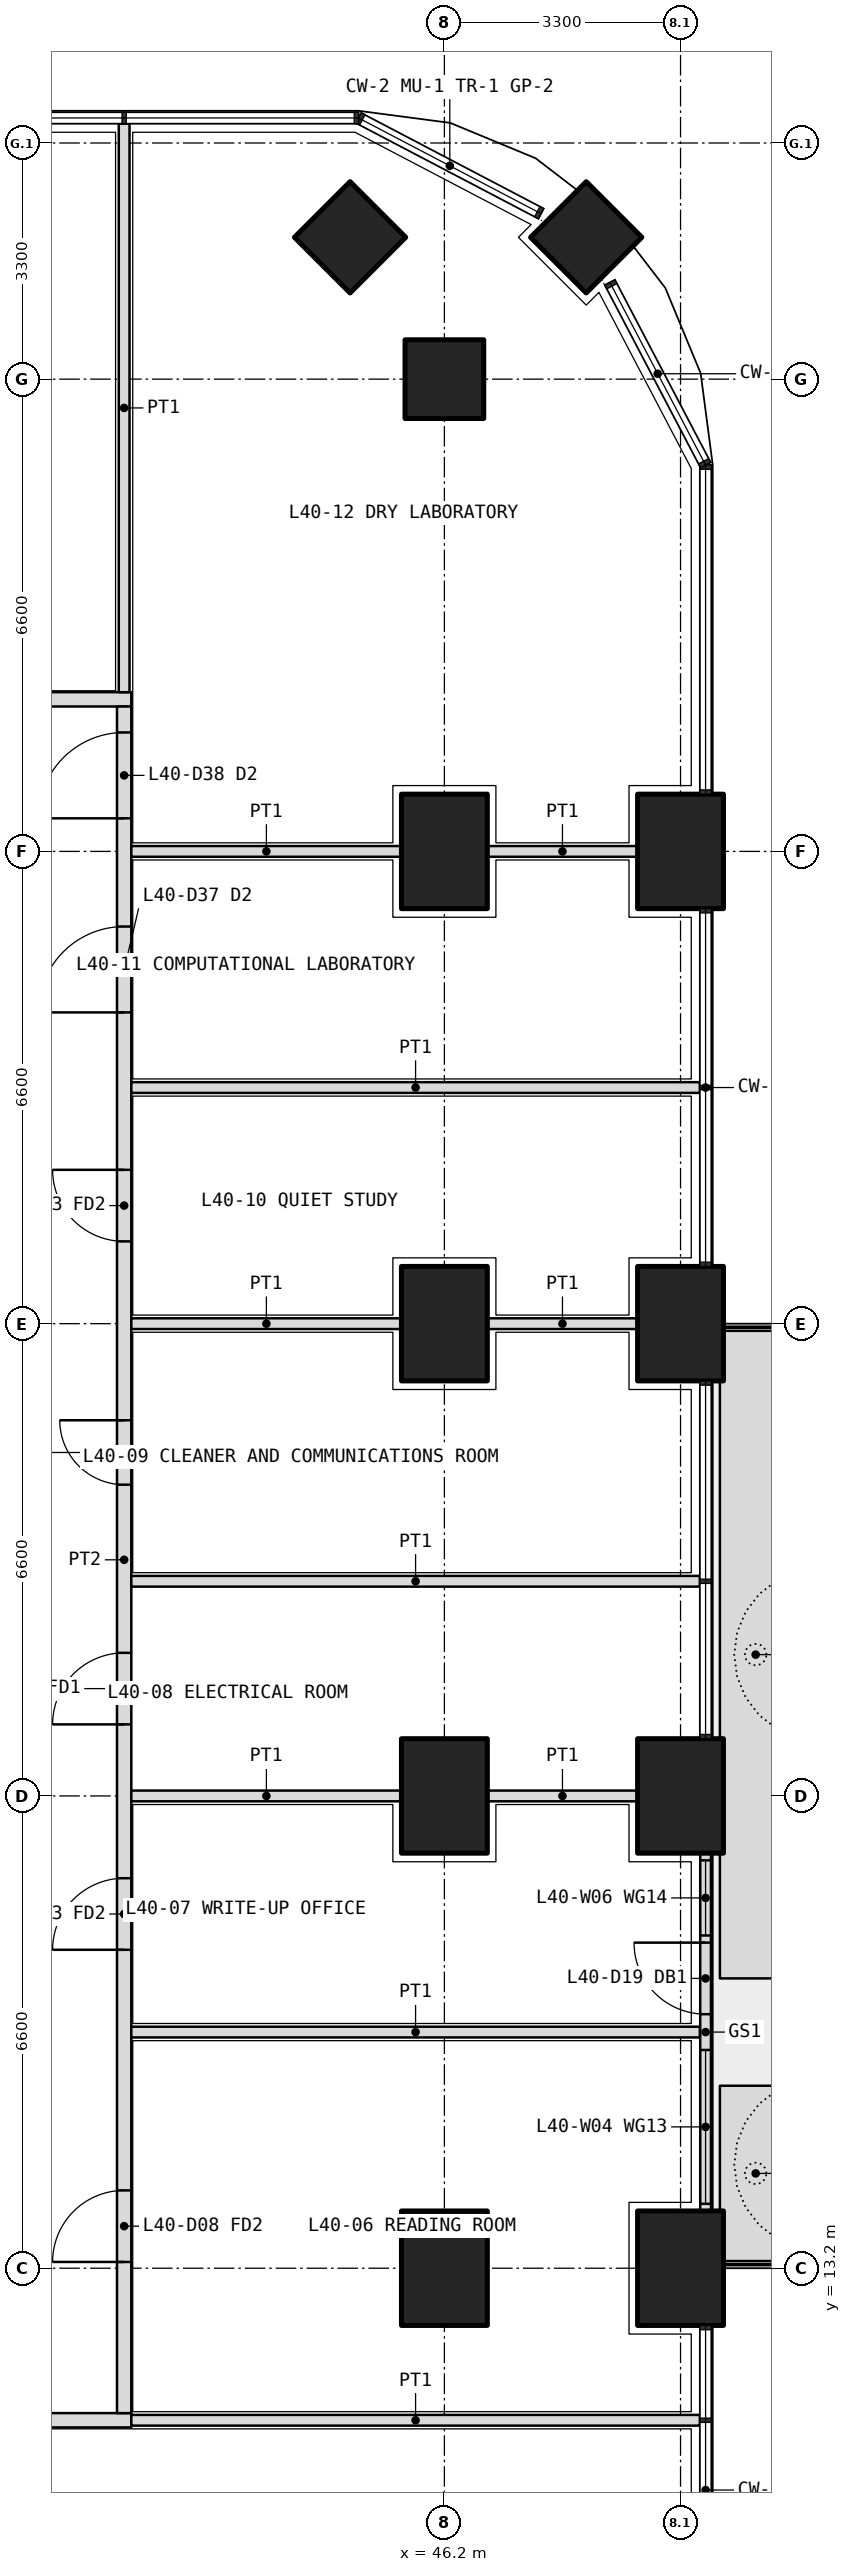
"""IFC4 building model, lengths in metres.
Left out: names, types, materials, properties, quantities, classifications, styles, units other than length and angle.
Written with IfcOpenShell. Run it as: python <this file> out.ifc"""

import sys

from ifc_helpers import new_model, si_unit, direction, frame, frame_2d, origin, origin_2d, place, context, subcontext, project, spatial, polyline, rectangle, outline, extrude, element, fill, save


model = new_model("IFC4")
c1 = context("Model", 3, precision=1e-05, world=origin(), true_north=direction((0.0, 1.0)))
c2 = subcontext(c1, "Body", "Model", "MODEL_VIEW")
j1 = project(units=[si_unit("LENGTHUNIT", "METRE"), si_unit("PLANEANGLEUNIT", "RADIAN")], contexts=[c1])
p1 = place(None, origin())
s1 = spatial("IfcSite", under=j1, at=p1, CompositionType="ELEMENT")
p2 = place(p1, origin())
s2 = spatial("IfcBuilding", under=s1, at=p2, CompositionType="ELEMENT")
p3 = place(p2, frame((0.0, 0.0, 176.7)))
s3 = spatial("IfcBuildingStorey", under=s2, at=p3, CompositionType="ELEMENT", Elevation=176.7)
p4 = place(p3, frame((48.182, 41.582, 0.0), z_axis=(0.0, 0.0, 1.0), x_axis=(0.707106781187, 0.707106781187, 0.0)))
e1 = element("IfcColumn", 1, at=p4, inside=s3, PredefinedType="COLUMN", context=c2, shape_type="SweptSolid", body=[
    extrude(rectangle(XDim=1.1, YDim=1.1, at=origin_2d()), origin(), (0.0, 0.0, 1.0), 4.2),
])
for number, where, z_axis, x_axis in (
    (2, (49.5, 13.2, 0.0), (0.0, 0.0, 1.0), (0.0, 1.0, 0.0)),
    (3, (49.5, 19.8, 0.0), (0.0, 0.0, 1.0), (0.0, 1.0, 0.0)),
    (4, (49.5, 26.4, 0.0), (0.0, 0.0, 1.0), (0.0, 1.0, 0.0)),
    (5, (49.5, 33.0, 0.0), (0.0, 0.0, 1.0), (0.0, 1.0, 0.0)),
):
    element("IfcColumn", number, at=place(p3, frame(where, z_axis=z_axis, x_axis=x_axis)), inside=s3, PredefinedType="COLUMN", context=c2, shape_type="SweptSolid", body=[
        extrude(rectangle(XDim=1.6, YDim=1.2, at=origin_2d()), origin(), (0.0, 0.0, 1.0), 4.2),
    ])
for number, where, z_axis, x_axis in (
    (6, (46.2, 39.6, 0.0), (0.0, 0.0, 1.0), (1.0, 0.0, 0.0)),
    (7, (44.882, 41.582, 0.0), (0.0, 0.0, 1.0), (0.707, 0.707, 0.0)),
):
    element("IfcColumn", number, at=place(p3, frame(where, z_axis=z_axis, x_axis=x_axis)), inside=s3, PredefinedType="COLUMN", context=c2, shape_type="SweptSolid", body=[
        extrude(rectangle(XDim=1.1, YDim=1.1, at=origin_2d()), origin(), (0.0, 0.0, 1.0), 4.2),
    ])
for number, where, z_axis, x_axis in (
    (8, (46.2, 13.2, 0.0), (0.0, 0.0, 1.0), (0.0, 1.0, 0.0)),
    (9, (46.2, 19.8, 0.0), (0.0, 0.0, 1.0), (0.0, 1.0, 0.0)),
    (10, (46.2, 26.4, 0.0), (0.0, 0.0, 1.0), (0.0, 1.0, 0.0)),
    (11, (46.2, 33.0, 0.0), (0.0, 0.0, 1.0), (0.0, 1.0, 0.0)),
):
    element("IfcColumn", number, at=place(p3, frame(where, z_axis=z_axis, x_axis=x_axis)), inside=s3, PredefinedType="COLUMN", context=c2, shape_type="SweptSolid", body=[
        extrude(rectangle(XDim=1.6, YDim=1.2, at=origin_2d()), origin(), (0.0, 0.0, 1.0), 4.2),
    ])
p5 = place(p3, origin())
e12 = element("IfcWall", 12, at=p5, inside=s3, PredefinedType="USERDEFINED", context=c2, shape_type="SweptSolid", body=[
    extrude(outline(polyline([(50.05, 13.3), (51.05, 13.3), (51.05, 15.75), (50.05, 15.75), (50.05, 13.3)]), holes=[polyline([(50.2, 13.45), (50.9, 13.45), (50.9, 15.6), (50.2, 15.6), (50.2, 13.45)])]), origin(), (0.0, 0.0, 1.0), 1.05),
])
p6 = place(p3, origin())
e13 = element("IfcWall", 13, at=p6, inside=s3, PredefinedType="USERDEFINED", context=c2, shape_type="SweptSolid", body=[
    extrude(outline(polyline([(50.05, 17.25), (51.05, 17.25), (51.05, 26.3), (50.05, 26.3), (50.05, 17.25)]), holes=[polyline([(50.2, 17.4), (50.9, 17.4), (50.9, 26.15), (50.2, 26.15), (50.2, 17.4)])]), origin(), (0.0, 0.0, 1.0), 1.05),
])
p7 = place(p3, frame((49.85, 14.0, 0.0), z_axis=(0.0, 0.0, 1.0), x_axis=(0.0, 1.0, 0.0)))
e14 = element("IfcWall", 14, at=p7, inside=s3, PredefinedType="SOLIDWALL", context=c2, shape_type="SweptSolid", body=[
    extrude(rectangle(XDim=5.0, YDim=0.15, at=frame_2d((2.5, 0.0))), origin(), (0.0, 0.0, 1.0), 2.7),
])
p8 = place(p7, frame((2.75, 0.0, 0.0)))
e15 = element("IfcOpeningElement", 15, at=p8, cuts=e14, PredefinedType="OPENING", context=c2, shape_type="SweptSolid", body=[
    extrude(rectangle(XDim=1.0, YDim=2.4, at=frame_2d((0.5, 1.2))), frame((0.0, 0.085, 0.0), z_axis=(0.0, -1.0, 0.0), x_axis=(1.0, 0.0, 0.0)), (0.0, 0.0, 1.0), 0.17),
])
p9 = place(p7, frame((0.1, 0.0, 0.1)))
e16 = element("IfcOpeningElement", 16, at=p9, cuts=e14, PredefinedType="OPENING", context=c2, shape_type="SweptSolid", body=[
    extrude(rectangle(XDim=2.15, YDim=2.3, at=frame_2d((1.075, 1.15))), frame((0.0, 0.085, 0.0), z_axis=(0.0, -1.0, 0.0), x_axis=(1.0, 0.0, 0.0)), (0.0, 0.0, 1.0), 0.17),
])
p10 = place(p7, frame((3.85, 0.0, 0.1)))
e17 = element("IfcOpeningElement", 17, at=p10, cuts=e14, PredefinedType="OPENING", context=c2, shape_type="SweptSolid", body=[
    extrude(rectangle(XDim=1.05, YDim=2.3, at=frame_2d((0.525, 1.15))), frame((0.0, 0.085, 0.0), z_axis=(0.0, -1.0, 0.0), x_axis=(1.0, 0.0, 0.0)), (0.0, 0.0, 1.0), 0.17),
])
p11 = place(p3, frame((36.3, 11.075, 0.0), z_axis=(0.0, 0.0, 1.0), x_axis=(1.0, 0.0, 0.0)))
e18 = element("IfcWall", 18, at=p11, inside=s3, PredefinedType="PARTITIONING", context=c2, shape_type="SweptSolid", body=[
    extrude(rectangle(XDim=5.525, YDim=0.2, at=frame_2d((2.762, 0.0))), origin(), (0.0, 0.0, 1.0), 2.85),
])
p12 = place(p11, frame((2.113, 0.0, 0.0)))
e19 = element("IfcOpeningElement", 19, at=p12, cuts=e18, PredefinedType="OPENING", context=c2, shape_type="SweptSolid", body=[
    extrude(rectangle(XDim=1.2, YDim=2.1, at=frame_2d((0.6, 1.05))), frame((0.0, 0.11, 0.0), z_axis=(0.0, -1.0, 0.0), x_axis=(1.0, 0.0, 0.0)), (0.0, 0.0, 1.0), 0.22),
])
p13 = place(p3, frame((10.975, 35.125, 0.0), z_axis=(0.0, 0.0, 1.0), x_axis=(1.0, 0.0, 0.0)))
e20 = element("IfcWall", 20, at=p13, inside=s3, PredefinedType="PARTITIONING", context=c2, shape_type="SweptSolid", body=[
    extrude(rectangle(XDim=30.85, YDim=0.2, at=frame_2d((15.425, 0.0))), origin(), (0.0, 0.0, 1.0), 2.85),
])
p14 = place(p13, frame((2.312, 0.0, 0.0)))
e21 = element("IfcOpeningElement", 21, at=p14, cuts=e20, PredefinedType="OPENING", context=c2, shape_type="SweptSolid", body=[
    extrude(rectangle(XDim=1.0, YDim=2.1, at=frame_2d((0.5, 1.05))), frame((0.0, 0.11, 0.0), z_axis=(0.0, -1.0, 0.0), x_axis=(1.0, 0.0, 0.0)), (0.0, 0.0, 1.0), 0.22),
])
p15 = place(p13, frame((7.125, 0.0, 0.0)))
e22 = element("IfcOpeningElement", 22, at=p15, cuts=e20, PredefinedType="OPENING", context=c2, shape_type="SweptSolid", body=[
    extrude(rectangle(XDim=1.0, YDim=2.1, at=frame_2d((0.5, 1.05))), frame((0.0, 0.11, 0.0), z_axis=(0.0, -1.0, 0.0), x_axis=(1.0, 0.0, 0.0)), (0.0, 0.0, 1.0), 0.22),
])
p16 = place(p13, frame((10.425, 0.0, 0.0)))
e23 = element("IfcOpeningElement", 23, at=p16, cuts=e20, PredefinedType="OPENING", context=c2, shape_type="SweptSolid", body=[
    extrude(rectangle(XDim=1.0, YDim=2.1, at=frame_2d((0.5, 1.05))), frame((0.0, 0.11, 0.0), z_axis=(0.0, -1.0, 0.0), x_axis=(1.0, 0.0, 0.0)), (0.0, 0.0, 1.0), 0.22),
])
p17 = place(p13, frame((16.575, 0.0, 0.0)))
e24 = element("IfcOpeningElement", 24, at=p17, cuts=e20, PredefinedType="OPENING", context=c2, shape_type="SweptSolid", body=[
    extrude(rectangle(XDim=1.0, YDim=2.1, at=frame_2d((0.5, 1.05))), frame((0.0, 0.11, 0.0), z_axis=(0.0, -1.0, 0.0), x_axis=(1.0, 0.0, 0.0)), (0.0, 0.0, 1.0), 0.22),
])
p18 = place(p13, frame((25.887, 0.0, 0.0)))
e25 = element("IfcOpeningElement", 25, at=p18, cuts=e20, PredefinedType="OPENING", context=c2, shape_type="SweptSolid", body=[
    extrude(rectangle(XDim=1.0, YDim=2.1, at=frame_2d((0.5, 1.05))), frame((0.0, 0.11, 0.0), z_axis=(0.0, -1.0, 0.0), x_axis=(1.0, 0.0, 0.0)), (0.0, 0.0, 1.0), 0.22),
])
p19 = place(p3, frame((41.725, 11.175, 0.0), z_axis=(0.0, 0.0, 1.0), x_axis=(0.0, 1.0, 0.0)))
e26 = element("IfcWall", 26, at=p19, inside=s3, PredefinedType="PARTITIONING", context=c2, shape_type="SweptSolid", body=[
    extrude(rectangle(XDim=23.85, YDim=0.2, at=frame_2d((11.925, 0.0))), origin(), (0.0, 0.0, 1.0), 2.85),
])
p20 = place(p19, frame((2.113, 0.0, 0.0)))
e27 = element("IfcOpeningElement", 27, at=p20, cuts=e26, PredefinedType="OPENING", context=c2, shape_type="SweptSolid", body=[
    extrude(rectangle(XDim=1.0, YDim=2.1, at=frame_2d((0.5, 1.05))), frame((0.0, 0.11, 0.0), z_axis=(0.0, -1.0, 0.0), x_axis=(1.0, 0.0, 0.0)), (0.0, 0.0, 1.0), 0.22),
])
p21 = place(p19, frame((6.475, 0.0, 0.0)))
e28 = element("IfcOpeningElement", 28, at=p21, cuts=e26, PredefinedType="OPENING", context=c2, shape_type="SweptSolid", body=[
    extrude(rectangle(XDim=1.0, YDim=2.1, at=frame_2d((0.5, 1.05))), frame((0.0, 0.11, 0.0), z_axis=(0.0, -1.0, 0.0), x_axis=(1.0, 0.0, 0.0)), (0.0, 0.0, 1.0), 0.22),
])
p22 = place(p19, frame((9.625, 0.0, 0.0)))
e29 = element("IfcOpeningElement", 29, at=p22, cuts=e26, PredefinedType="OPENING", context=c2, shape_type="SweptSolid", body=[
    extrude(rectangle(XDim=1.0, YDim=2.1, at=frame_2d((0.5, 1.05))), frame((0.0, 0.11, 0.0), z_axis=(0.0, -1.0, 0.0), x_axis=(1.0, 0.0, 0.0)), (0.0, 0.0, 1.0), 0.22),
])
p23 = place(p19, frame((12.975, 0.0, 0.0)))
e30 = element("IfcOpeningElement", 30, at=p23, cuts=e26, PredefinedType="OPENING", context=c2, shape_type="SweptSolid", body=[
    extrude(rectangle(XDim=0.9, YDim=2.1, at=frame_2d((0.45, 1.05))), frame((0.0, 0.11, 0.0), z_axis=(0.0, -1.0, 0.0), x_axis=(1.0, 0.0, 0.0)), (0.0, 0.0, 1.0), 0.22),
])
p24 = place(p19, frame((16.375, 0.0, 0.0)))
e31 = element("IfcOpeningElement", 31, at=p24, cuts=e26, PredefinedType="OPENING", context=c2, shape_type="SweptSolid", body=[
    extrude(rectangle(XDim=1.0, YDim=2.1, at=frame_2d((0.5, 1.05))), frame((0.0, 0.11, 0.0), z_axis=(0.0, -1.0, 0.0), x_axis=(1.0, 0.0, 0.0)), (0.0, 0.0, 1.0), 0.22),
])
p25 = place(p19, frame((19.575, 0.0, 0.0)))
e32 = element("IfcOpeningElement", 32, at=p25, cuts=e26, PredefinedType="OPENING", context=c2, shape_type="SweptSolid", body=[
    extrude(rectangle(XDim=1.2, YDim=2.1, at=frame_2d((0.6, 1.05))), frame((0.0, 0.11, 0.0), z_axis=(0.0, -1.0, 0.0), x_axis=(1.0, 0.0, 0.0)), (0.0, 0.0, 1.0), 0.22),
])
p26 = place(p19, frame((22.288, 0.0, 0.0)))
e33 = element("IfcOpeningElement", 33, at=p26, cuts=e26, PredefinedType="OPENING", context=c2, shape_type="SweptSolid", body=[
    extrude(rectangle(XDim=1.2, YDim=2.1, at=frame_2d((0.6, 1.05))), frame((0.0, 0.11, 0.0), z_axis=(0.0, -1.0, 0.0), x_axis=(1.0, 0.0, 0.0)), (0.0, 0.0, 1.0), 0.22),
])
p27 = place(p3, frame((49.77, 11.075, 0.0), z_axis=(0.0, 0.0, 1.0), x_axis=(-1.0, 0.0, 0.0)))
e34 = element("IfcWall", 34, at=p27, inside=s3, PredefinedType="PARTITIONING", context=c2, shape_type="SweptSolid", body=[
    extrude(rectangle(XDim=7.945, YDim=0.15, at=frame_2d((3.973, 0.0))), origin(), (0.0, 0.0, 1.0), 2.7),
])
p28 = place(p3, frame((41.725, 43.17, 0.0), z_axis=(0.0, 0.0, 1.0), x_axis=(0.0, -1.0, 0.0)))
e35 = element("IfcWall", 35, at=p28, inside=s3, PredefinedType="PARTITIONING", context=c2, shape_type="SweptSolid", body=[
    extrude(rectangle(XDim=7.945, YDim=0.15, at=frame_2d((3.972, 0.0))), origin(), (0.0, 0.0, 1.0), 2.7),
])
p29 = place(p3, frame((49.77, 22.8, 0.0), z_axis=(0.0, 0.0, 1.0), x_axis=(-1.0, 0.0, 0.0)))
e36 = element("IfcWall", 36, at=p29, inside=s3, PredefinedType="PARTITIONING", context=c2, shape_type="SweptSolid", body=[
    extrude(rectangle(XDim=7.945, YDim=0.15, at=frame_2d((3.973, 0.0))), origin(), (0.0, 0.0, 1.0), 2.7),
])
p30 = place(p3, frame((48.9, 26.4, 0.0), z_axis=(0.0, 0.0, 1.0), x_axis=(-1.0, 0.0, 0.0)))
e37 = element("IfcWall", 37, at=p30, inside=s3, PredefinedType="PARTITIONING", context=c2, shape_type="SweptSolid", body=[
    extrude(rectangle(XDim=2.1, YDim=0.15, at=frame_2d((1.05, 0.0))), origin(), (0.0, 0.0, 1.0), 2.85),
])
p31 = place(p3, frame((45.6, 26.4, 0.0), z_axis=(0.0, 0.0, 1.0), x_axis=(-1.0, 0.0, 0.0)))
e38 = element("IfcWall", 38, at=p31, inside=s3, PredefinedType="PARTITIONING", context=c2, shape_type="SweptSolid", body=[
    extrude(rectangle(XDim=3.775, YDim=0.15, at=frame_2d((1.888, 0.0))), origin(), (0.0, 0.0, 1.0), 2.85),
])
p32 = place(p3, frame((49.77, 16.5, 0.0), z_axis=(0.0, 0.0, 1.0), x_axis=(-1.0, 0.0, 0.0)))
e39 = element("IfcWall", 39, at=p32, inside=s3, PredefinedType="PARTITIONING", context=c2, shape_type="SweptSolid", body=[
    extrude(rectangle(XDim=7.945, YDim=0.15, at=frame_2d((3.973, 0.0))), origin(), (0.0, 0.0, 1.0), 2.7),
])
p33 = place(p3, frame((48.9, 19.8, 0.0), z_axis=(0.0, 0.0, 1.0), x_axis=(-1.0, 0.0, 0.0)))
e40 = element("IfcWall", 40, at=p33, inside=s3, PredefinedType="PARTITIONING", context=c2, shape_type="SweptSolid", body=[
    extrude(rectangle(XDim=2.1, YDim=0.15, at=frame_2d((1.05, 0.0))), origin(), (0.0, 0.0, 1.0), 2.85),
])
p34 = place(p3, frame((45.6, 19.8, 0.0), z_axis=(0.0, 0.0, 1.0), x_axis=(-1.0, 0.0, 0.0)))
e41 = element("IfcWall", 41, at=p34, inside=s3, PredefinedType="PARTITIONING", context=c2, shape_type="SweptSolid", body=[
    extrude(rectangle(XDim=3.775, YDim=0.15, at=frame_2d((1.888, 0.0))), origin(), (0.0, 0.0, 1.0), 2.85),
])
p35 = place(p3, frame((49.77, 29.7, 0.0), z_axis=(0.0, 0.0, 1.0), x_axis=(-1.0, 0.0, 0.0)))
e42 = element("IfcWall", 42, at=p35, inside=s3, PredefinedType="PARTITIONING", context=c2, shape_type="SweptSolid", body=[
    extrude(rectangle(XDim=7.945, YDim=0.15, at=frame_2d((3.973, 0.0))), origin(), (0.0, 0.0, 1.0), 2.7),
])
p36 = place(p3, frame((48.9, 33.0, 0.0), z_axis=(0.0, 0.0, 1.0), x_axis=(-1.0, 0.0, 0.0)))
e43 = element("IfcWall", 43, at=p36, inside=s3, PredefinedType="PARTITIONING", context=c2, shape_type="SweptSolid", body=[
    extrude(rectangle(XDim=2.1, YDim=0.15, at=frame_2d((1.05, 0.0))), origin(), (0.0, 0.0, 1.0), 2.85),
])
p37 = place(p3, frame((45.6, 33.0, 0.0), z_axis=(0.0, 0.0, 1.0), x_axis=(-1.0, 0.0, 0.0)))
e44 = element("IfcWall", 44, at=p37, inside=s3, PredefinedType="PARTITIONING", context=c2, shape_type="SweptSolid", body=[
    extrude(rectangle(XDim=3.775, YDim=0.15, at=frame_2d((1.888, 0.0))), origin(), (0.0, 0.0, 1.0), 2.85),
])
p38 = place(p8, origin())
e45 = element("IfcDoor", 45, at=p38, inside=s3, OperationType="SINGLE_SWING_RIGHT", PredefinedType="DOOR", context=c2, shape_type="SweptSolid", body=[
    extrude(rectangle(XDim=1.0, YDim=2.4, at=frame_2d((0.5, 1.2))), frame((0.0, 0.025, 0.0), z_axis=(0.0, -1.0, 0.0), x_axis=(1.0, 0.0, 0.0)), (0.0, 0.0, 1.0), 0.05),
])
fill(e15, e45)
p39 = place(p9, origin())
e46 = element("IfcWindow", 46, at=p39, inside=s3, PartitioningType="SINGLE_PANEL", PredefinedType="WINDOW", context=c2, shape_type="SweptSolid", body=[
    extrude(rectangle(XDim=2.15, YDim=2.3, at=frame_2d((1.075, 1.15))), frame((0.0, 0.03, 0.0), z_axis=(0.0, -1.0, 0.0), x_axis=(1.0, 0.0, 0.0)), (0.0, 0.0, 1.0), 0.06),
])
fill(e16, e46)
p40 = place(p10, origin())
e47 = element("IfcWindow", 47, at=p40, inside=s3, PartitioningType="SINGLE_PANEL", PredefinedType="WINDOW", context=c2, shape_type="SweptSolid", body=[
    extrude(rectangle(XDim=1.05, YDim=2.3, at=frame_2d((0.525, 1.15))), frame((0.0, 0.03, 0.0), z_axis=(0.0, -1.0, 0.0), x_axis=(1.0, 0.0, 0.0)), (0.0, 0.0, 1.0), 0.06),
])
fill(e17, e47)
p41 = place(p20, origin())
e48 = element("IfcDoor", 48, at=p41, inside=s3, OperationType="SINGLE_SWING_LEFT", PredefinedType="DOOR", context=c2, shape_type="SweptSolid", body=[
    extrude(rectangle(XDim=1.0, YDim=2.1, at=frame_2d((0.5, 1.05))), frame((0.0, 0.025, 0.0), z_axis=(0.0, -1.0, 0.0), x_axis=(1.0, 0.0, 0.0)), (0.0, 0.0, 1.0), 0.05),
])
fill(e27, e48)
p42 = place(p21, origin())
e49 = element("IfcDoor", 49, at=p42, inside=s3, OperationType="SINGLE_SWING_LEFT", PredefinedType="DOOR", context=c2, shape_type="SweptSolid", body=[
    extrude(rectangle(XDim=1.0, YDim=2.1, at=frame_2d((0.5, 1.05))), frame((0.0, 0.025, 0.0), z_axis=(0.0, -1.0, 0.0), x_axis=(1.0, 0.0, 0.0)), (0.0, 0.0, 1.0), 0.05),
])
fill(e28, e49)
p43 = place(p22, origin())
e50 = element("IfcDoor", 50, at=p43, inside=s3, OperationType="SINGLE_SWING_LEFT", PredefinedType="DOOR", context=c2, shape_type="SweptSolid", body=[
    extrude(rectangle(XDim=1.0, YDim=2.1, at=frame_2d((0.5, 1.05))), frame((0.0, 0.025, 0.0), z_axis=(0.0, -1.0, 0.0), x_axis=(1.0, 0.0, 0.0)), (0.0, 0.0, 1.0), 0.05),
])
fill(e29, e50)
p44 = place(p23, origin())
e51 = element("IfcDoor", 51, at=p44, inside=s3, OperationType="SINGLE_SWING_RIGHT", PredefinedType="DOOR", context=c2, shape_type="SweptSolid", body=[
    extrude(rectangle(XDim=0.9, YDim=2.1, at=frame_2d((0.45, 1.05))), frame((0.0, 0.025, 0.0), z_axis=(0.0, -1.0, 0.0), x_axis=(1.0, 0.0, 0.0)), (0.0, 0.0, 1.0), 0.05),
])
fill(e30, e51)
p45 = place(p24, origin())
e52 = element("IfcDoor", 52, at=p45, inside=s3, OperationType="SINGLE_SWING_RIGHT", PredefinedType="DOOR", context=c2, shape_type="SweptSolid", body=[
    extrude(rectangle(XDim=1.0, YDim=2.1, at=frame_2d((0.5, 1.05))), frame((0.0, 0.025, 0.0), z_axis=(0.0, -1.0, 0.0), x_axis=(1.0, 0.0, 0.0)), (0.0, 0.0, 1.0), 0.05),
])
fill(e31, e52)
p46 = place(p25, origin())
e53 = element("IfcDoor", 53, at=p46, inside=s3, OperationType="DOUBLE_DOOR_SINGLE_SWING", PredefinedType="DOOR", context=c2, shape_type="SweptSolid", body=[
    extrude(rectangle(XDim=1.2, YDim=2.1, at=frame_2d((0.6, 1.05))), frame((0.0, 0.025, 0.0), z_axis=(0.0, -1.0, 0.0), x_axis=(1.0, 0.0, 0.0)), (0.0, 0.0, 1.0), 0.05),
])
fill(e32, e53)
p47 = place(p26, origin())
e54 = element("IfcDoor", 54, at=p47, inside=s3, OperationType="DOUBLE_DOOR_SINGLE_SWING", PredefinedType="DOOR", context=c2, shape_type="SweptSolid", body=[
    extrude(rectangle(XDim=1.2, YDim=2.1, at=frame_2d((0.6, 1.05))), frame((0.0, 0.025, 0.0), z_axis=(0.0, -1.0, 0.0), x_axis=(1.0, 0.0, 0.0)), (0.0, 0.0, 1.0), 0.05),
])
fill(e33, e54)
save(model, sys.argv[1])
